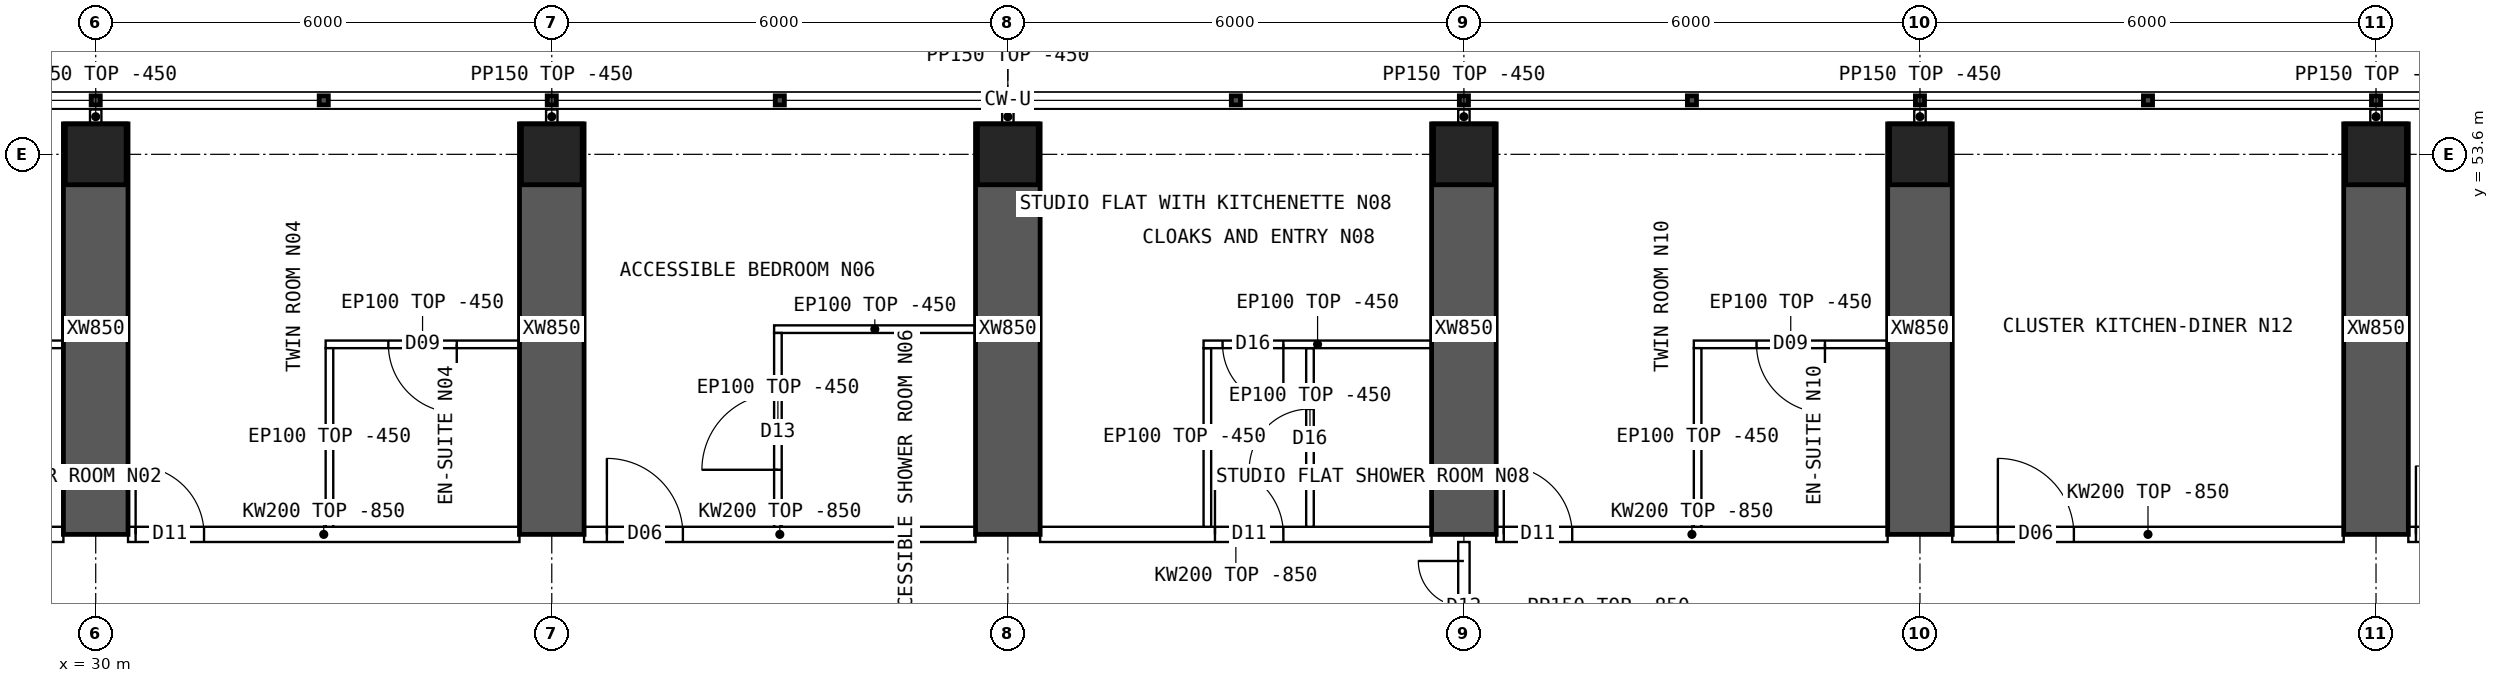
"""IFC4 building model, lengths in metres.
Left out: names, types, materials, properties, quantities, classifications, styles, units other than length and angle.
Written with IfcOpenShell. Run it as: python <this file> out.ifc"""

import sys

from ifc_helpers import new_model, si_unit, direction, frame, frame_2d, origin, origin_2d, place, context, subcontext, project, spatial, polyline, rectangle, hollow_rectangle, outline, extrude, element, fill, save


model = new_model("IFC4")
c1 = context("Model", 3, precision=1e-05, world=origin(), true_north=direction((0.0, 1.0)))
c2 = subcontext(c1, "Body", "Model", "MODEL_VIEW")
j1 = project(units=[si_unit("LENGTHUNIT", "METRE"), si_unit("PLANEANGLEUNIT", "RADIAN")], contexts=[c1])
p1 = place(None, origin())
s1 = spatial("IfcSite", under=j1, at=p1, CompositionType="ELEMENT")
p2 = place(p1, origin())
s2 = spatial("IfcBuilding", under=s1, at=p2, CompositionType="ELEMENT")
p3 = place(p2, frame((0.0, 0.0, 144.85)))
s3 = spatial("IfcBuildingStorey", under=s2, at=p3, CompositionType="ELEMENT", Elevation=144.85)
for number, where, z_axis, x_axis in (
    (1, (30.0, 53.6, 0.0), (0.0, 0.0, 1.0), (1.0, 0.0, 0.0)),
    (2, (36.0, 53.6, 0.0), (0.0, 0.0, 1.0), (1.0, 0.0, 0.0)),
    (3, (42.0, 53.6, 0.0), (0.0, 0.0, 1.0), (1.0, 0.0, 0.0)),
    (4, (48.0, 53.6, 0.0), (0.0, 0.0, 1.0), (1.0, 0.0, 0.0)),
    (5, (54.0, 53.6, 0.0), (0.0, 0.0, 1.0), (1.0, 0.0, 0.0)),
    (6, (60.0, 53.6, 0.0), (0.0, 0.0, 1.0), (1.0, 0.0, 0.0)),
):
    element("IfcColumn", number, at=place(p3, frame(where, z_axis=z_axis, x_axis=x_axis)), inside=s3, PredefinedType="COLUMN", context=c2, shape_type="SweptSolid", body=[
        extrude(hollow_rectangle(XDim=0.8, YDim=0.8, WallThickness=0.08, at=origin_2d()), origin(), (0.0, 0.0, 1.0), 3.75),
    ])
for number, where, z_axis, x_axis in (
    (7, (30.0, 48.6, 0.0), (0.0, 0.0, 1.0), (0.0, 1.0, 0.0)),
    (8, (36.0, 48.6, 0.0), (0.0, 0.0, 1.0), (0.0, 1.0, 0.0)),
    (9, (42.0, 48.6, 0.0), (0.0, 0.0, 1.0), (0.0, 1.0, 0.0)),
    (10, (48.0, 48.6, 0.0), (0.0, 0.0, 1.0), (0.0, 1.0, 0.0)),
    (11, (54.0, 48.6, 0.0), (0.0, 0.0, 1.0), (0.0, 1.0, 0.0)),
    (12, (60.0, 48.6, 0.0), (0.0, 0.0, 1.0), (0.0, 1.0, 0.0)),
):
    element("IfcWall", number, at=place(p3, frame(where, z_axis=z_axis, x_axis=x_axis)), inside=s3, PredefinedType="SHEAR", context=c2, shape_type="SweptSolid", body=[
        extrude(rectangle(XDim=5.4, YDim=0.85, at=frame_2d((2.7, 0.0))), origin(), (0.0, 0.0, 1.0), 3.75),
    ])
p4 = place(p3, frame((24.425, 48.6, 0.0), z_axis=(0.0, 0.0, 1.0), x_axis=(1.0, 0.0, 0.0)))
e13 = element("IfcWall", 13, at=p4, inside=s3, PredefinedType="SOLIDWALL", context=c2, shape_type="SweptSolid", body=[
    extrude(outline(polyline([(0.0, 0.0), (5.15, 0.0), (5.15, 2.9), (0.0, 2.9), (0.0, 0.0)])), frame((0.0, 0.1, 0.0), z_axis=(0.0, -1.0, 0.0), x_axis=(1.0, 0.0, 0.0)), (0.0, 0.0, 1.0), 0.2),
])
p5 = place(p4, frame((2.3, 0.0, 0.0)))
e14 = element("IfcOpeningElement", 14, at=p5, cuts=e13, PredefinedType="OPENING", context=c2, shape_type="SweptSolid", body=[
    extrude(rectangle(XDim=0.9, YDim=2.1, at=frame_2d((0.45, 1.05))), frame((0.0, 0.11, 0.0), z_axis=(0.0, -1.0, 0.0), x_axis=(1.0, 0.0, 0.0)), (0.0, 0.0, 1.0), 0.22),
])
p6 = place(p3, frame((30.425, 48.6, 0.0), z_axis=(0.0, 0.0, 1.0), x_axis=(1.0, 0.0, 0.0)))
e15 = element("IfcWall", 15, at=p6, inside=s3, PredefinedType="SOLIDWALL", context=c2, shape_type="SweptSolid", body=[
    extrude(outline(polyline([(0.0, 0.0), (5.15, 0.0), (5.15, 2.9), (0.0, 2.9), (0.0, 0.0)])), frame((0.0, 0.1, 0.0), z_axis=(0.0, -1.0, 0.0), x_axis=(1.0, 0.0, 0.0)), (0.0, 0.0, 1.0), 0.2),
])
p7 = place(p6, frame((0.1, 0.0, 0.0)))
e16 = element("IfcOpeningElement", 16, at=p7, cuts=e15, PredefinedType="OPENING", context=c2, shape_type="SweptSolid", body=[
    extrude(rectangle(XDim=0.9, YDim=2.1, at=frame_2d((0.45, 1.05))), frame((0.0, 0.11, 0.0), z_axis=(0.0, -1.0, 0.0), x_axis=(1.0, 0.0, 0.0)), (0.0, 0.0, 1.0), 0.22),
])
p8 = place(p3, frame((36.425, 48.6, 0.0), z_axis=(0.0, 0.0, 1.0), x_axis=(1.0, 0.0, 0.0)))
e17 = element("IfcWall", 17, at=p8, inside=s3, PredefinedType="SOLIDWALL", context=c2, shape_type="SweptSolid", body=[
    extrude(outline(polyline([(0.0, 0.0), (5.15, 0.0), (5.15, 2.9), (0.0, 2.9), (0.0, 0.0)])), frame((0.0, 0.1, 0.0), z_axis=(0.0, -1.0, 0.0), x_axis=(1.0, 0.0, 0.0)), (0.0, 0.0, 1.0), 0.2),
])
p9 = place(p8, frame((0.3, 0.0, 0.0)))
e18 = element("IfcOpeningElement", 18, at=p9, cuts=e17, PredefinedType="OPENING", context=c2, shape_type="SweptSolid", body=[
    extrude(rectangle(XDim=1.0, YDim=2.1, at=frame_2d((0.5, 1.05))), frame((0.0, 0.11, 0.0), z_axis=(0.0, -1.0, 0.0), x_axis=(1.0, 0.0, 0.0)), (0.0, 0.0, 1.0), 0.22),
])
p10 = place(p3, frame((42.425, 48.6, 0.0), z_axis=(0.0, 0.0, 1.0), x_axis=(1.0, 0.0, 0.0)))
e19 = element("IfcWall", 19, at=p10, inside=s3, PredefinedType="SOLIDWALL", context=c2, shape_type="SweptSolid", body=[
    extrude(outline(polyline([(0.0, 0.0), (5.15, 0.0), (5.15, 2.9), (0.0, 2.9), (0.0, 0.0)])), frame((0.0, 0.1, 0.0), z_axis=(0.0, -1.0, 0.0), x_axis=(1.0, 0.0, 0.0)), (0.0, 0.0, 1.0), 0.2),
])
p11 = place(p10, frame((2.3, 0.0, 0.0)))
e20 = element("IfcOpeningElement", 20, at=p11, cuts=e19, PredefinedType="OPENING", context=c2, shape_type="SweptSolid", body=[
    extrude(rectangle(XDim=0.9, YDim=2.1, at=frame_2d((0.45, 1.05))), frame((0.0, 0.11, 0.0), z_axis=(0.0, -1.0, 0.0), x_axis=(1.0, 0.0, 0.0)), (0.0, 0.0, 1.0), 0.22),
])
p12 = place(p3, frame((48.425, 48.6, 0.0), z_axis=(0.0, 0.0, 1.0), x_axis=(1.0, 0.0, 0.0)))
e21 = element("IfcWall", 21, at=p12, inside=s3, PredefinedType="SOLIDWALL", context=c2, shape_type="SweptSolid", body=[
    extrude(outline(polyline([(0.0, 0.0), (5.15, 0.0), (5.15, 2.9), (0.0, 2.9), (0.0, 0.0)])), frame((0.0, 0.1, 0.0), z_axis=(0.0, -1.0, 0.0), x_axis=(1.0, 0.0, 0.0)), (0.0, 0.0, 1.0), 0.2),
])
p13 = place(p12, frame((0.1, 0.0, 0.0)))
e22 = element("IfcOpeningElement", 22, at=p13, cuts=e21, PredefinedType="OPENING", context=c2, shape_type="SweptSolid", body=[
    extrude(rectangle(XDim=0.9, YDim=2.1, at=frame_2d((0.45, 1.05))), frame((0.0, 0.11, 0.0), z_axis=(0.0, -1.0, 0.0), x_axis=(1.0, 0.0, 0.0)), (0.0, 0.0, 1.0), 0.22),
])
p14 = place(p3, frame((54.425, 48.6, 0.0), z_axis=(0.0, 0.0, 1.0), x_axis=(1.0, 0.0, 0.0)))
e23 = element("IfcWall", 23, at=p14, inside=s3, PredefinedType="SOLIDWALL", context=c2, shape_type="SweptSolid", body=[
    extrude(outline(polyline([(0.0, 0.0), (5.15, 0.0), (5.15, 2.9), (0.0, 2.9), (0.0, 0.0)])), frame((0.0, 0.1, 0.0), z_axis=(0.0, -1.0, 0.0), x_axis=(1.0, 0.0, 0.0)), (0.0, 0.0, 1.0), 0.2),
])
p15 = place(p14, frame((0.6, 0.0, 0.0)))
e24 = element("IfcOpeningElement", 24, at=p15, cuts=e23, PredefinedType="OPENING", context=c2, shape_type="SweptSolid", body=[
    extrude(rectangle(XDim=1.0, YDim=2.1, at=frame_2d((0.5, 1.05))), frame((0.0, 0.11, 0.0), z_axis=(0.0, -1.0, 0.0), x_axis=(1.0, 0.0, 0.0)), (0.0, 0.0, 1.0), 0.22),
])
p16 = place(p3, frame((60.425, 48.6, 0.0), z_axis=(0.0, 0.0, 1.0), x_axis=(1.0, 0.0, 0.0)))
e25 = element("IfcWall", 25, at=p16, inside=s3, PredefinedType="SOLIDWALL", context=c2, shape_type="SweptSolid", body=[
    extrude(outline(polyline([(0.0, 0.0), (5.15, 0.0), (5.15, 2.9), (0.0, 2.9), (0.0, 0.0)])), frame((0.0, 0.1, 0.0), z_axis=(0.0, -1.0, 0.0), x_axis=(1.0, 0.0, 0.0)), (0.0, 0.0, 1.0), 0.2),
])
p17 = place(p16, frame((0.1, 0.0, 0.0)))
e26 = element("IfcOpeningElement", 26, at=p17, cuts=e25, PredefinedType="OPENING", context=c2, shape_type="SweptSolid", body=[
    extrude(rectangle(XDim=0.9, YDim=2.1, at=frame_2d((0.45, 1.05))), frame((0.0, 0.11, 0.0), z_axis=(0.0, -1.0, 0.0), x_axis=(1.0, 0.0, 0.0)), (0.0, 0.0, 1.0), 0.22),
])
p18 = place(p3, frame((26.575, 51.1, 0.0), z_axis=(0.0, 0.0, 1.0), x_axis=(1.0, 0.0, 0.0)))
e27 = element("IfcWall", 27, at=p18, inside=s3, PredefinedType="PARTITIONING", context=c2, shape_type="SweptSolid", body=[
    extrude(rectangle(XDim=3.0, YDim=0.1, at=frame_2d((1.5, 0.0))), origin(), (0.0, 0.0, 1.0), 3.3),
])
p19 = place(p18, frame((0.25, 0.0, 0.0)))
e28 = element("IfcOpeningElement", 28, at=p19, cuts=e27, PredefinedType="OPENING", context=c2, shape_type="SweptSolid", body=[
    extrude(rectangle(XDim=0.8, YDim=2.1, at=frame_2d((0.4, 1.05))), frame((0.0, 0.06, 0.0), z_axis=(0.0, -1.0, 0.0), x_axis=(1.0, 0.0, 0.0)), (0.0, 0.0, 1.0), 0.12),
])
p20 = place(p3, frame((33.025, 51.1, 0.0), z_axis=(0.0, 0.0, 1.0), x_axis=(1.0, 0.0, 0.0)))
e29 = element("IfcWall", 29, at=p20, inside=s3, PredefinedType="PARTITIONING", context=c2, shape_type="SweptSolid", body=[
    extrude(rectangle(XDim=2.55, YDim=0.1, at=frame_2d((1.275, 0.0))), origin(), (0.0, 0.0, 1.0), 3.3),
])
p21 = place(p20, frame((0.825, 0.0, 0.0)))
e30 = element("IfcOpeningElement", 30, at=p21, cuts=e29, PredefinedType="OPENING", context=c2, shape_type="SweptSolid", body=[
    extrude(rectangle(XDim=0.9, YDim=2.1, at=frame_2d((0.45, 1.05))), frame((0.0, 0.06, 0.0), z_axis=(0.0, -1.0, 0.0), x_axis=(1.0, 0.0, 0.0)), (0.0, 0.0, 1.0), 0.12),
])
p22 = place(p3, frame((33.075, 51.05, 0.0), z_axis=(0.0, 0.0, 1.0), x_axis=(0.0, -1.0, 0.0)))
e31 = element("IfcWall", 31, at=p22, inside=s3, PredefinedType="PARTITIONING", context=c2, shape_type="SweptSolid", body=[
    extrude(outline(polyline([(0.0, 0.0), (2.35, 0.0), (2.35, 2.9), (2.302, 2.9), (2.3, 3.3), (0.0, 3.3), (0.0, 0.0)])), frame((0.0, 0.05, 0.0), z_axis=(0.0, -1.0, 0.0), x_axis=(1.0, 0.0, 0.0)), (0.0, 0.0, 1.0), 0.1),
])
p23 = place(p3, frame((38.925, 51.3, 0.0), z_axis=(0.0, 0.0, 1.0), x_axis=(1.0, 0.0, 0.0)))
e32 = element("IfcWall", 32, at=p23, inside=s3, PredefinedType="PARTITIONING", context=c2, shape_type="SweptSolid", body=[
    extrude(rectangle(XDim=2.65, YDim=0.1, at=frame_2d((1.325, 0.0))), origin(), (0.0, 0.0, 1.0), 3.3),
])
p24 = place(p3, frame((38.975, 51.25, 0.0), z_axis=(0.0, 0.0, 1.0), x_axis=(0.0, -1.0, 0.0)))
e33 = element("IfcWall", 33, at=p24, inside=s3, PredefinedType="PARTITIONING", context=c2, shape_type="SweptSolid", body=[
    extrude(outline(polyline([(0.0, 0.0), (2.55, 0.0), (2.55, 2.9), (2.502, 2.9), (2.5, 3.3), (0.0, 3.3), (0.0, 0.0)])), frame((0.0, 0.05, 0.0), z_axis=(0.0, -1.0, 0.0), x_axis=(1.0, 0.0, 0.0)), (0.0, 0.0, 1.0), 0.1),
])
p25 = place(p24, frame((0.8, 0.0, 0.0)))
e34 = element("IfcOpeningElement", 34, at=p25, cuts=e33, PredefinedType="OPENING", context=c2, shape_type="SweptSolid", body=[
    extrude(rectangle(XDim=1.0, YDim=2.1, at=frame_2d((0.5, 1.05))), frame((0.0, 0.06, 0.0), z_axis=(0.0, -1.0, 0.0), x_axis=(1.0, 0.0, 0.0)), (0.0, 0.0, 1.0), 0.12),
])
p26 = place(p3, frame((44.575, 51.1, 0.0), z_axis=(0.0, 0.0, 1.0), x_axis=(1.0, 0.0, 0.0)))
e35 = element("IfcWall", 35, at=p26, inside=s3, PredefinedType="PARTITIONING", context=c2, shape_type="SweptSolid", body=[
    extrude(rectangle(XDim=3.0, YDim=0.1, at=frame_2d((1.5, 0.0))), origin(), (0.0, 0.0, 1.0), 3.3),
])
p27 = place(p26, frame((0.25, 0.0, 0.0)))
e36 = element("IfcOpeningElement", 36, at=p27, cuts=e35, PredefinedType="OPENING", context=c2, shape_type="SweptSolid", body=[
    extrude(rectangle(XDim=0.8, YDim=2.1, at=frame_2d((0.4, 1.05))), frame((0.0, 0.06, 0.0), z_axis=(0.0, -1.0, 0.0), x_axis=(1.0, 0.0, 0.0)), (0.0, 0.0, 1.0), 0.12),
])
p28 = place(p3, frame((44.625, 51.05, 0.0), z_axis=(0.0, 0.0, 1.0), x_axis=(0.0, -1.0, 0.0)))
e37 = element("IfcWall", 37, at=p28, inside=s3, PredefinedType="PARTITIONING", context=c2, shape_type="SweptSolid", body=[
    extrude(outline(polyline([(0.0, 0.0), (2.35, 0.0), (2.35, 2.9), (2.302, 2.9), (2.3, 3.3), (0.0, 3.3), (0.0, 0.0)])), frame((0.0, 0.05, 0.0), z_axis=(0.0, -1.0, 0.0), x_axis=(1.0, 0.0, 0.0)), (0.0, 0.0, 1.0), 0.1),
])
p29 = place(p3, frame((45.975, 51.05, 0.0), z_axis=(0.0, 0.0, 1.0), x_axis=(0.0, -1.0, 0.0)))
e38 = element("IfcWall", 38, at=p29, inside=s3, PredefinedType="PARTITIONING", context=c2, shape_type="SweptSolid", body=[
    extrude(outline(polyline([(0.0, 0.0), (2.35, 0.0), (2.35, 2.9), (2.302, 2.9), (2.3, 3.3), (0.0, 3.3), (0.0, 0.0)])), frame((0.0, 0.05, 0.0), z_axis=(0.0, -1.0, 0.0), x_axis=(1.0, 0.0, 0.0)), (0.0, 0.0, 1.0), 0.1),
])
p30 = place(p29, frame((0.8, 0.0, 0.0)))
e39 = element("IfcOpeningElement", 39, at=p30, cuts=e38, PredefinedType="OPENING", context=c2, shape_type="SweptSolid", body=[
    extrude(rectangle(XDim=0.8, YDim=2.1, at=frame_2d((0.4, 1.05))), frame((0.0, 0.06, 0.0), z_axis=(0.0, -1.0, 0.0), x_axis=(1.0, 0.0, 0.0)), (0.0, 0.0, 1.0), 0.12),
])
p31 = place(p3, frame((51.025, 51.1, 0.0), z_axis=(0.0, 0.0, 1.0), x_axis=(1.0, 0.0, 0.0)))
e40 = element("IfcWall", 40, at=p31, inside=s3, PredefinedType="PARTITIONING", context=c2, shape_type="SweptSolid", body=[
    extrude(rectangle(XDim=2.55, YDim=0.1, at=frame_2d((1.275, 0.0))), origin(), (0.0, 0.0, 1.0), 3.3),
])
p32 = place(p31, frame((0.825, 0.0, 0.0)))
e41 = element("IfcOpeningElement", 41, at=p32, cuts=e40, PredefinedType="OPENING", context=c2, shape_type="SweptSolid", body=[
    extrude(rectangle(XDim=0.9, YDim=2.1, at=frame_2d((0.45, 1.05))), frame((0.0, 0.06, 0.0), z_axis=(0.0, -1.0, 0.0), x_axis=(1.0, 0.0, 0.0)), (0.0, 0.0, 1.0), 0.12),
])
p33 = place(p3, frame((51.075, 51.05, 0.0), z_axis=(0.0, 0.0, 1.0), x_axis=(0.0, -1.0, 0.0)))
e42 = element("IfcWall", 42, at=p33, inside=s3, PredefinedType="PARTITIONING", context=c2, shape_type="SweptSolid", body=[
    extrude(outline(polyline([(0.0, 0.0), (2.35, 0.0), (2.35, 2.9), (2.302, 2.9), (2.3, 3.3), (0.0, 3.3), (0.0, 0.0)])), frame((0.0, 0.05, 0.0), z_axis=(0.0, -1.0, 0.0), x_axis=(1.0, 0.0, 0.0)), (0.0, 0.0, 1.0), 0.1),
])
p34 = place(p3, frame((48.0, 46.8, 0.0), z_axis=(0.0, 0.0, 1.0), x_axis=(0.0, 1.0, 0.0)))
e43 = element("IfcWall", 43, at=p34, inside=s3, PredefinedType="PARTITIONING", context=c2, shape_type="SweptSolid", body=[
    extrude(outline(polyline([(0.0, 0.0), (1.7, 0.0), (1.7, 2.9), (0.0, 2.9), (0.0, 0.0)])), frame((0.0, 0.075, 0.0), z_axis=(0.0, -1.0, 0.0), x_axis=(1.0, 0.0, 0.0)), (0.0, 0.0, 1.0), 0.15),
])
p35 = place(p34, frame((0.25, 0.0, 0.0)))
e44 = element("IfcOpeningElement", 44, at=p35, cuts=e43, PredefinedType="OPENING", context=c2, shape_type="SweptSolid", body=[
    extrude(rectangle(XDim=1.2, YDim=2.1, at=frame_2d((0.6, 1.05))), frame((0.0, 0.085, 0.0), z_axis=(0.0, -1.0, 0.0), x_axis=(1.0, 0.0, 0.0)), (0.0, 0.0, 1.0), 0.17),
])
for number, where, z_axis, x_axis in (
    (45, (30.0, 54.0, 0.0), (0.0, 0.0, 1.0), (0.0, 1.0, 0.0)),
    (46, (36.0, 54.0, 0.0), (0.0, 0.0, 1.0), (0.0, 1.0, 0.0)),
    (47, (42.0, 54.0, 0.0), (0.0, 0.0, 1.0), (0.0, 1.0, 0.0)),
    (48, (48.0, 54.0, 0.0), (0.0, 0.0, 1.0), (0.0, 1.0, 0.0)),
    (49, (54.0, 54.0, 0.0), (0.0, 0.0, 1.0), (0.0, 1.0, 0.0)),
    (50, (60.0, 54.0, 0.0), (0.0, 0.0, 1.0), (0.0, 1.0, 0.0)),
):
    element("IfcWall", number, at=place(p3, frame(where, z_axis=z_axis, x_axis=x_axis)), inside=s3, PredefinedType="PARTITIONING", context=c2, shape_type="SweptSolid", body=[
        extrude(rectangle(XDim=0.19, YDim=0.15, at=frame_2d((0.095, 0.0))), origin(), (0.0, 0.0, 1.0), 3.3),
    ])
p36 = place(p21, origin())
e51 = element("IfcDoor", 51, at=p36, inside=s3, OperationType="SINGLE_SWING_RIGHT", PredefinedType="DOOR", context=c2, shape_type="SweptSolid", body=[
    extrude(rectangle(XDim=0.9, YDim=2.1, at=frame_2d((0.45, 1.05))), frame((0.0, 0.025, 0.0), z_axis=(0.0, -1.0, 0.0), x_axis=(1.0, 0.0, 0.0)), (0.0, 0.0, 1.0), 0.05),
])
fill(e30, e51)
p37 = place(p7, origin())
e52 = element("IfcDoor", 52, at=p37, inside=s3, OperationType="SINGLE_SWING_LEFT", PredefinedType="DOOR", context=c2, shape_type="SweptSolid", body=[
    extrude(rectangle(XDim=0.9, YDim=2.1, at=frame_2d((0.45, 1.05))), frame((0.0, 0.025, 0.0), z_axis=(0.0, -1.0, 0.0), x_axis=(1.0, 0.0, 0.0)), (0.0, 0.0, 1.0), 0.05),
])
fill(e16, e52)
p38 = place(p25, origin())
e53 = element("IfcDoor", 53, at=p38, inside=s3, OperationType="SINGLE_SWING_RIGHT", PredefinedType="DOOR", context=c2, shape_type="SweptSolid", body=[
    extrude(rectangle(XDim=1.0, YDim=2.1, at=frame_2d((0.5, 1.05))), frame((0.0, 0.025, 0.0), z_axis=(0.0, -1.0, 0.0), x_axis=(1.0, 0.0, 0.0)), (0.0, 0.0, 1.0), 0.05),
])
fill(e34, e53)
p39 = place(p9, origin())
e54 = element("IfcDoor", 54, at=p39, inside=s3, OperationType="SINGLE_SWING_LEFT", PredefinedType="DOOR", context=c2, shape_type="SweptSolid", body=[
    extrude(rectangle(XDim=1.0, YDim=2.1, at=frame_2d((0.5, 1.05))), frame((0.0, 0.025, 0.0), z_axis=(0.0, -1.0, 0.0), x_axis=(1.0, 0.0, 0.0)), (0.0, 0.0, 1.0), 0.05),
])
fill(e18, e54)
p40 = place(p27, origin())
e55 = element("IfcDoor", 55, at=p40, inside=s3, OperationType="SINGLE_SWING_RIGHT", PredefinedType="DOOR", context=c2, shape_type="SweptSolid", body=[
    extrude(rectangle(XDim=0.8, YDim=2.1, at=frame_2d((0.4, 1.05))), frame((0.0, 0.025, 0.0), z_axis=(0.0, -1.0, 0.0), x_axis=(1.0, 0.0, 0.0)), (0.0, 0.0, 1.0), 0.05),
])
fill(e36, e55)
p41 = place(p30, origin())
e56 = element("IfcDoor", 56, at=p41, inside=s3, OperationType="SINGLE_SWING_RIGHT", PredefinedType="DOOR", context=c2, shape_type="SweptSolid", body=[
    extrude(rectangle(XDim=0.8, YDim=2.1, at=frame_2d((0.4, 1.05))), frame((0.0, 0.025, 0.0), z_axis=(0.0, -1.0, 0.0), x_axis=(1.0, 0.0, 0.0)), (0.0, 0.0, 1.0), 0.05),
])
fill(e39, e56)
p42 = place(p11, origin())
e57 = element("IfcDoor", 57, at=p42, inside=s3, OperationType="SINGLE_SWING_LEFT", PredefinedType="DOOR", context=c2, shape_type="SweptSolid", body=[
    extrude(rectangle(XDim=0.9, YDim=2.1, at=frame_2d((0.45, 1.05))), frame((0.0, 0.025, 0.0), z_axis=(0.0, -1.0, 0.0), x_axis=(1.0, 0.0, 0.0)), (0.0, 0.0, 1.0), 0.05),
])
fill(e20, e57)
p43 = place(p32, origin())
e58 = element("IfcDoor", 58, at=p43, inside=s3, OperationType="SINGLE_SWING_RIGHT", PredefinedType="DOOR", context=c2, shape_type="SweptSolid", body=[
    extrude(rectangle(XDim=0.9, YDim=2.1, at=frame_2d((0.45, 1.05))), frame((0.0, 0.025, 0.0), z_axis=(0.0, -1.0, 0.0), x_axis=(1.0, 0.0, 0.0)), (0.0, 0.0, 1.0), 0.05),
])
fill(e41, e58)
p44 = place(p13, origin())
e59 = element("IfcDoor", 59, at=p44, inside=s3, OperationType="SINGLE_SWING_LEFT", PredefinedType="DOOR", context=c2, shape_type="SweptSolid", body=[
    extrude(rectangle(XDim=0.9, YDim=2.1, at=frame_2d((0.45, 1.05))), frame((0.0, 0.025, 0.0), z_axis=(0.0, -1.0, 0.0), x_axis=(1.0, 0.0, 0.0)), (0.0, 0.0, 1.0), 0.05),
])
fill(e22, e59)
p45 = place(p15, origin())
e60 = element("IfcDoor", 60, at=p45, inside=s3, OperationType="SINGLE_SWING_LEFT", PredefinedType="DOOR", context=c2, shape_type="SweptSolid", body=[
    extrude(rectangle(XDim=1.0, YDim=2.1, at=frame_2d((0.5, 1.05))), frame((0.0, 0.025, 0.0), z_axis=(0.0, -1.0, 0.0), x_axis=(1.0, 0.0, 0.0)), (0.0, 0.0, 1.0), 0.05),
])
fill(e24, e60)
p46 = place(p17, origin())
e61 = element("IfcDoor", 61, at=p46, inside=s3, OperationType="SINGLE_SWING_LEFT", PredefinedType="DOOR", context=c2, shape_type="SweptSolid", body=[
    extrude(rectangle(XDim=0.9, YDim=2.1, at=frame_2d((0.45, 1.05))), frame((0.0, 0.025, 0.0), z_axis=(0.0, -1.0, 0.0), x_axis=(1.0, 0.0, 0.0)), (0.0, 0.0, 1.0), 0.05),
])
fill(e26, e61)
p47 = place(p35, origin())
e62 = element("IfcDoor", 62, at=p47, inside=s3, OperationType="DOUBLE_DOOR_SINGLE_SWING", PredefinedType="DOOR", context=c2, shape_type="SweptSolid", body=[
    extrude(rectangle(XDim=1.2, YDim=2.1, at=frame_2d((0.6, 1.05))), frame((0.0, 0.025, 0.0), z_axis=(0.0, -1.0, 0.0), x_axis=(1.0, 0.0, 0.0)), (0.0, 0.0, 1.0), 0.05),
])
fill(e44, e62)
save(model, sys.argv[1])
